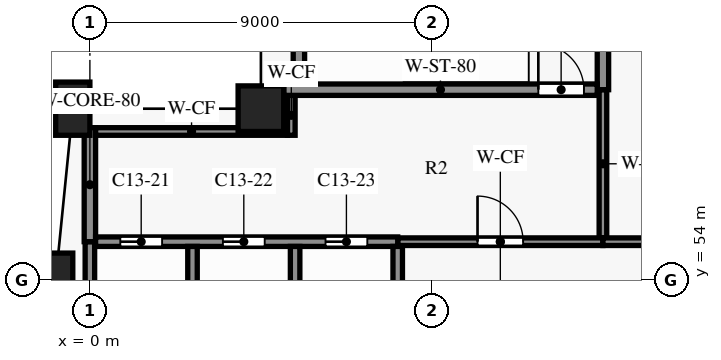
"""IFC4 building model, lengths in metres.
Left out: names, types, materials, properties, quantities, classifications, styles, units other than length and angle.
Written with IfcOpenShell. Run it as: python <this file> out.ifc"""

import sys

from ifc_helpers import new_model, si_unit, direction, frame, frame_2d, origin, origin_2d, place, context, subcontext, project, spatial, rectangle, extrude, element, fill, save


model = new_model("IFC4")
c1 = context("Model", 3, precision=1e-05, world=origin(), true_north=direction((0.0, 1.0)))
c2 = subcontext(c1, "Body", "Model", "MODEL_VIEW")
j1 = project(units=[si_unit("LENGTHUNIT", "METRE"), si_unit("PLANEANGLEUNIT", "RADIAN")], contexts=[c1])
p1 = place(None, origin())
s1 = spatial("IfcSite", under=j1, at=p1, CompositionType="ELEMENT")
p2 = place(p1, origin())
s2 = spatial("IfcBuilding", under=s1, at=p2, CompositionType="ELEMENT")
p3 = place(p2, frame((0.0, 0.0, 84.3)))
s3 = spatial("IfcBuildingStorey", under=s2, at=p3, CompositionType="ELEMENT", Elevation=84.3)
for number, where, z_axis, x_axis in (
    (1, (-0.45, 58.5, 0.0), (0.0, 0.0, 1.0), (-0.1, -0.995, 0.0)),
    (2, (-0.9, 54.0, 0.0), (0.0, 0.0, 1.0), (0.0, -1.0, 0.0)),
):
    element("IfcColumn", number, at=place(p3, frame(where, z_axis=z_axis, x_axis=x_axis)), inside=s3, PredefinedType="COLUMN", context=c2, shape_type="SweptSolid", body=[
        extrude(rectangle(XDim=0.9, YDim=1.4, at=origin_2d()), origin(), (0.0, 0.0, 1.0), 4.2),
    ])
p4 = place(p3, frame((4.5, 58.5, 0.0), z_axis=(0.0, 0.0, 1.0), x_axis=(1.0, 0.0, 0.0)))
e3 = element("IfcColumn", 3, at=p4, inside=s3, PredefinedType="COLUMN", context=c2, shape_type="SweptSolid", body=[
    extrude(rectangle(XDim=1.2, YDim=1.2, at=origin_2d()), origin(), (0.0, 0.0, 1.0), 4.2),
])
p5 = place(p3, frame((8.1, 55.0, 0.0), z_axis=(0.0, 0.0, 1.0), x_axis=(1.0, 0.0, 0.0)))
e4 = element("IfcWall", 4, at=p5, inside=s3, PredefinedType="PARTITIONING", context=c2, shape_type="SweptSolid", body=[
    extrude(rectangle(XDim=5.4, YDim=0.2, at=frame_2d((2.7, 0.0))), origin(), (0.0, 0.0, 1.0), 3.9),
])
p6 = place(p5, frame((2.1, 0.0, 0.0)))
e5 = element("IfcOpeningElement", 5, at=p6, cuts=e4, PredefinedType="OPENING", context=c2, shape_type="SweptSolid", body=[
    extrude(rectangle(XDim=1.2, YDim=2.2, at=frame_2d((0.6, 1.1))), frame((0.0, 0.11, 0.0), z_axis=(0.0, -1.0, 0.0), x_axis=(1.0, 0.0, 0.0)), (0.0, 0.0, 1.0), 0.22),
])
p7 = place(p3, frame((13.5, 55.0, 0.0), z_axis=(0.0, 0.0, 1.0), x_axis=(1.0, 0.0, 0.0)))
e6 = element("IfcWall", 6, at=p7, inside=s3, PredefinedType="PARTITIONING", context=c2, shape_type="SweptSolid", body=[
    extrude(rectangle(XDim=4.0, YDim=0.2, at=frame_2d((2.0, 0.0))), origin(), (0.0, 0.0, 1.0), 3.9),
])
p8 = place(p7, frame((1.5, 0.0, 0.0)))
e7 = element("IfcOpeningElement", 7, at=p8, cuts=e6, PredefinedType="OPENING", context=c2, shape_type="SweptSolid", body=[
    extrude(rectangle(XDim=1.0, YDim=2.1, at=frame_2d((0.5, 1.05))), frame((0.0, 0.11, 0.0), z_axis=(0.0, -1.0, 0.0), x_axis=(1.0, 0.0, 0.0)), (0.0, 0.0, 1.0), 0.22),
])
p9 = place(p3, frame((0.15, 55.0, 0.0), z_axis=(0.0, 0.0, 1.0), x_axis=(1.0, 0.0, 0.0)))
e8 = element("IfcWall", 8, at=p9, inside=s3, PredefinedType="SHEAR", context=c2, shape_type="SweptSolid", body=[
    extrude(rectangle(XDim=7.95, YDim=0.25, at=frame_2d((3.975, 0.0))), origin(), (0.0, 0.0, 1.0), 3.9),
])
p10 = place(p9, frame((0.65, 0.0, 0.0)))
e9 = element("IfcOpeningElement", 9, at=p10, cuts=e8, PredefinedType="OPENING", context=c2, shape_type="SweptSolid", body=[
    extrude(rectangle(XDim=1.1, YDim=2.1, at=frame_2d((0.55, 1.05))), frame((0.0, 0.135, 0.0), z_axis=(0.0, -1.0, 0.0), x_axis=(1.0, 0.0, 0.0)), (0.0, 0.0, 1.0), 0.27),
])
p11 = place(p9, frame((3.35, 0.0, 0.0)))
e10 = element("IfcOpeningElement", 10, at=p11, cuts=e8, PredefinedType="OPENING", context=c2, shape_type="SweptSolid", body=[
    extrude(rectangle(XDim=1.1, YDim=2.1, at=frame_2d((0.55, 1.05))), frame((0.0, 0.135, 0.0), z_axis=(0.0, -1.0, 0.0), x_axis=(1.0, 0.0, 0.0)), (0.0, 0.0, 1.0), 0.27),
])
p12 = place(p9, frame((6.05, 0.0, 0.0)))
e11 = element("IfcOpeningElement", 11, at=p12, cuts=e8, PredefinedType="OPENING", context=c2, shape_type="SweptSolid", body=[
    extrude(rectangle(XDim=1.1, YDim=2.1, at=frame_2d((0.55, 1.05))), frame((0.0, 0.135, 0.0), z_axis=(0.0, -1.0, 0.0), x_axis=(1.0, 0.0, 0.0)), (0.0, 0.0, 1.0), 0.27),
])
p13 = place(p3, frame((0.15, 57.9, 0.0), z_axis=(0.0, 0.0, 1.0), x_axis=(1.0, 0.0, 0.0)))
e12 = element("IfcWall", 12, at=p13, inside=s3, PredefinedType="PARTITIONING", context=c2, shape_type="SweptSolid", body=[
    extrude(rectangle(XDim=5.05, YDim=0.2, at=frame_2d((2.525, 0.0))), origin(), (0.0, 0.0, 1.0), 3.9),
])
p14 = place(p3, frame((5.1, 59.0, 0.0), z_axis=(0.0, 0.0, 1.0), x_axis=(1.0, 0.0, 0.0)))
e13 = element("IfcWall", 13, at=p14, inside=s3, PredefinedType="SHEAR", context=c2, shape_type="SweptSolid", body=[
    extrude(rectangle(XDim=8.25, YDim=0.3, at=frame_2d((4.125, 0.0))), origin(), (0.0, 0.0, 1.0), 3.9),
])
p15 = place(p14, frame((6.7, 0.0, 0.0)))
e14 = element("IfcOpeningElement", 14, at=p15, cuts=e13, PredefinedType="OPENING", context=c2, shape_type="SweptSolid", body=[
    extrude(rectangle(XDim=1.2, YDim=2.2, at=frame_2d((0.6, 1.1))), frame((0.0, 0.16, 0.0), z_axis=(0.0, -1.0, 0.0), x_axis=(1.0, 0.0, 0.0)), (0.0, 0.0, 1.0), 0.32),
])
p16 = place(p3, frame((0.0, 55.0, 0.0), z_axis=(0.0, 0.0, 1.0), x_axis=(0.0, 1.0, 0.0)))
e15 = element("IfcWall", 15, at=p16, inside=s3, PredefinedType="SHEAR", context=c2, shape_type="SweptSolid", body=[
    extrude(rectangle(XDim=3.0, YDim=0.3, at=frame_2d((1.5, 0.0))), origin(), (0.0, 0.0, 1.0), 3.9),
])
p17 = place(p3, frame((0.0, 51.65, 0.0), z_axis=(0.0, 0.0, 1.0), x_axis=(0.0, 1.0, 0.0)))
e16 = element("IfcWall", 16, at=p17, inside=s3, PredefinedType="SHEAR", context=c2, shape_type="SweptSolid", body=[
    extrude(rectangle(XDim=3.35, YDim=0.25, at=frame_2d((1.675, 0.0))), origin(), (0.0, 0.0, 1.0), 3.9),
])
p18 = place(p3, frame((2.7, 51.925, 0.0), z_axis=(0.0, 0.0, 1.0), x_axis=(0.0, 1.0, 0.0)))
e17 = element("IfcWall", 17, at=p18, inside=s3, PredefinedType="SHEAR", context=c2, shape_type="SweptSolid", body=[
    extrude(rectangle(XDim=2.95, YDim=0.25, at=frame_2d((1.475, 0.0))), origin(), (0.0, 0.0, 1.0), 3.9),
])
p19 = place(p3, frame((5.3, 57.8, 0.0), z_axis=(0.0, 0.0, 1.0), x_axis=(0.0, 1.0, 0.0)))
e18 = element("IfcWall", 18, at=p19, inside=s3, PredefinedType="PARTITIONING", context=c2, shape_type="SweptSolid", body=[
    extrude(rectangle(XDim=1.05, YDim=0.2, at=frame_2d((0.525, 0.0))), origin(), (0.0, 0.0, 1.0), 3.9),
])
p20 = place(p3, frame((5.4, 51.925, 0.0), z_axis=(0.0, 0.0, 1.0), x_axis=(0.0, 1.0, 0.0)))
e19 = element("IfcWall", 19, at=p20, inside=s3, PredefinedType="SHEAR", context=c2, shape_type="SweptSolid", body=[
    extrude(rectangle(XDim=2.95, YDim=0.25, at=frame_2d((1.475, 0.0))), origin(), (0.0, 0.0, 1.0), 3.9),
])
p21 = place(p3, frame((5.5, 59.15, 0.0), z_axis=(0.0, 0.0, 1.0), x_axis=(0.0, 1.0, 0.0)))
e20 = element("IfcWall", 20, at=p21, inside=s3, PredefinedType="SHEAR", context=c2, shape_type="SweptSolid", body=[
    extrude(rectangle(XDim=3.6, YDim=0.3, at=frame_2d((1.8, 0.0))), origin(), (0.0, 0.0, 1.0), 3.9),
])
p22 = place(p3, frame((8.1, 51.925, 0.0), z_axis=(0.0, 0.0, 1.0), x_axis=(0.0, 1.0, 0.0)))
e21 = element("IfcWall", 21, at=p22, inside=s3, PredefinedType="SHEAR", context=c2, shape_type="SweptSolid", body=[
    extrude(rectangle(XDim=2.95, YDim=0.25, at=frame_2d((1.475, 0.0))), origin(), (0.0, 0.0, 1.0), 3.9),
])
p23 = place(p3, frame((13.5, 55.1, 0.0), z_axis=(0.0, 0.0, 1.0), x_axis=(0.0, 1.0, 0.0)))
e22 = element("IfcWall", 22, at=p23, inside=s3, PredefinedType="PARTITIONING", context=c2, shape_type="SweptSolid", body=[
    extrude(rectangle(XDim=3.9, YDim=0.2, at=frame_2d((1.95, 0.0))), origin(), (0.0, 0.0, 1.0), 3.9),
])
p24 = place(p3, frame((13.5, 59.0, 0.0), z_axis=(0.0, 0.0, 1.0), x_axis=(0.0, 1.0, 0.0)))
e23 = element("IfcWall", 23, at=p24, inside=s3, PredefinedType="SHEAR", context=c2, shape_type="SweptSolid", body=[
    extrude(rectangle(XDim=3.75, YDim=0.3, at=frame_2d((1.875, 0.0))), origin(), (0.0, 0.0, 1.0), 3.9),
])
p25 = place(p6, origin())
e24 = element("IfcDoor", 24, at=p25, inside=s3, OperationType="SINGLE_SWING_RIGHT", PredefinedType="DOOR", context=c2, shape_type="SweptSolid", body=[
    extrude(rectangle(XDim=1.2, YDim=2.2, at=frame_2d((0.6, 1.1))), frame((0.0, 0.025, 0.0), z_axis=(0.0, -1.0, 0.0), x_axis=(1.0, 0.0, 0.0)), (0.0, 0.0, 1.0), 0.05),
])
fill(e5, e24)
p26 = place(p15, origin())
e25 = element("IfcDoor", 25, at=p26, inside=s3, OperationType="SINGLE_SWING_RIGHT", PredefinedType="DOOR", context=c2, shape_type="SweptSolid", body=[
    extrude(rectangle(XDim=1.2, YDim=2.2, at=frame_2d((0.6, 1.1))), frame((0.0, 0.025, 0.0), z_axis=(0.0, -1.0, 0.0), x_axis=(1.0, 0.0, 0.0)), (0.0, 0.0, 1.0), 0.05),
])
fill(e14, e25)
p27 = place(p10, origin())
e26 = element("IfcDoor", 26, at=p27, inside=s3, OperationType="DOUBLE_DOOR_SLIDING", PredefinedType="DOOR", context=c2, shape_type="SweptSolid", body=[
    extrude(rectangle(XDim=1.1, YDim=2.1, at=frame_2d((0.55, 1.05))), frame((0.0, 0.025, 0.0), z_axis=(0.0, -1.0, 0.0), x_axis=(1.0, 0.0, 0.0)), (0.0, 0.0, 1.0), 0.05),
])
fill(e9, e26)
p28 = place(p11, origin())
e27 = element("IfcDoor", 27, at=p28, inside=s3, OperationType="DOUBLE_DOOR_SLIDING", PredefinedType="DOOR", context=c2, shape_type="SweptSolid", body=[
    extrude(rectangle(XDim=1.1, YDim=2.1, at=frame_2d((0.55, 1.05))), frame((0.0, 0.025, 0.0), z_axis=(0.0, -1.0, 0.0), x_axis=(1.0, 0.0, 0.0)), (0.0, 0.0, 1.0), 0.05),
])
fill(e10, e27)
p29 = place(p12, origin())
e28 = element("IfcDoor", 28, at=p29, inside=s3, OperationType="DOUBLE_DOOR_SLIDING", PredefinedType="DOOR", context=c2, shape_type="SweptSolid", body=[
    extrude(rectangle(XDim=1.1, YDim=2.1, at=frame_2d((0.55, 1.05))), frame((0.0, 0.025, 0.0), z_axis=(0.0, -1.0, 0.0), x_axis=(1.0, 0.0, 0.0)), (0.0, 0.0, 1.0), 0.05),
])
fill(e11, e28)
save(model, sys.argv[1])
